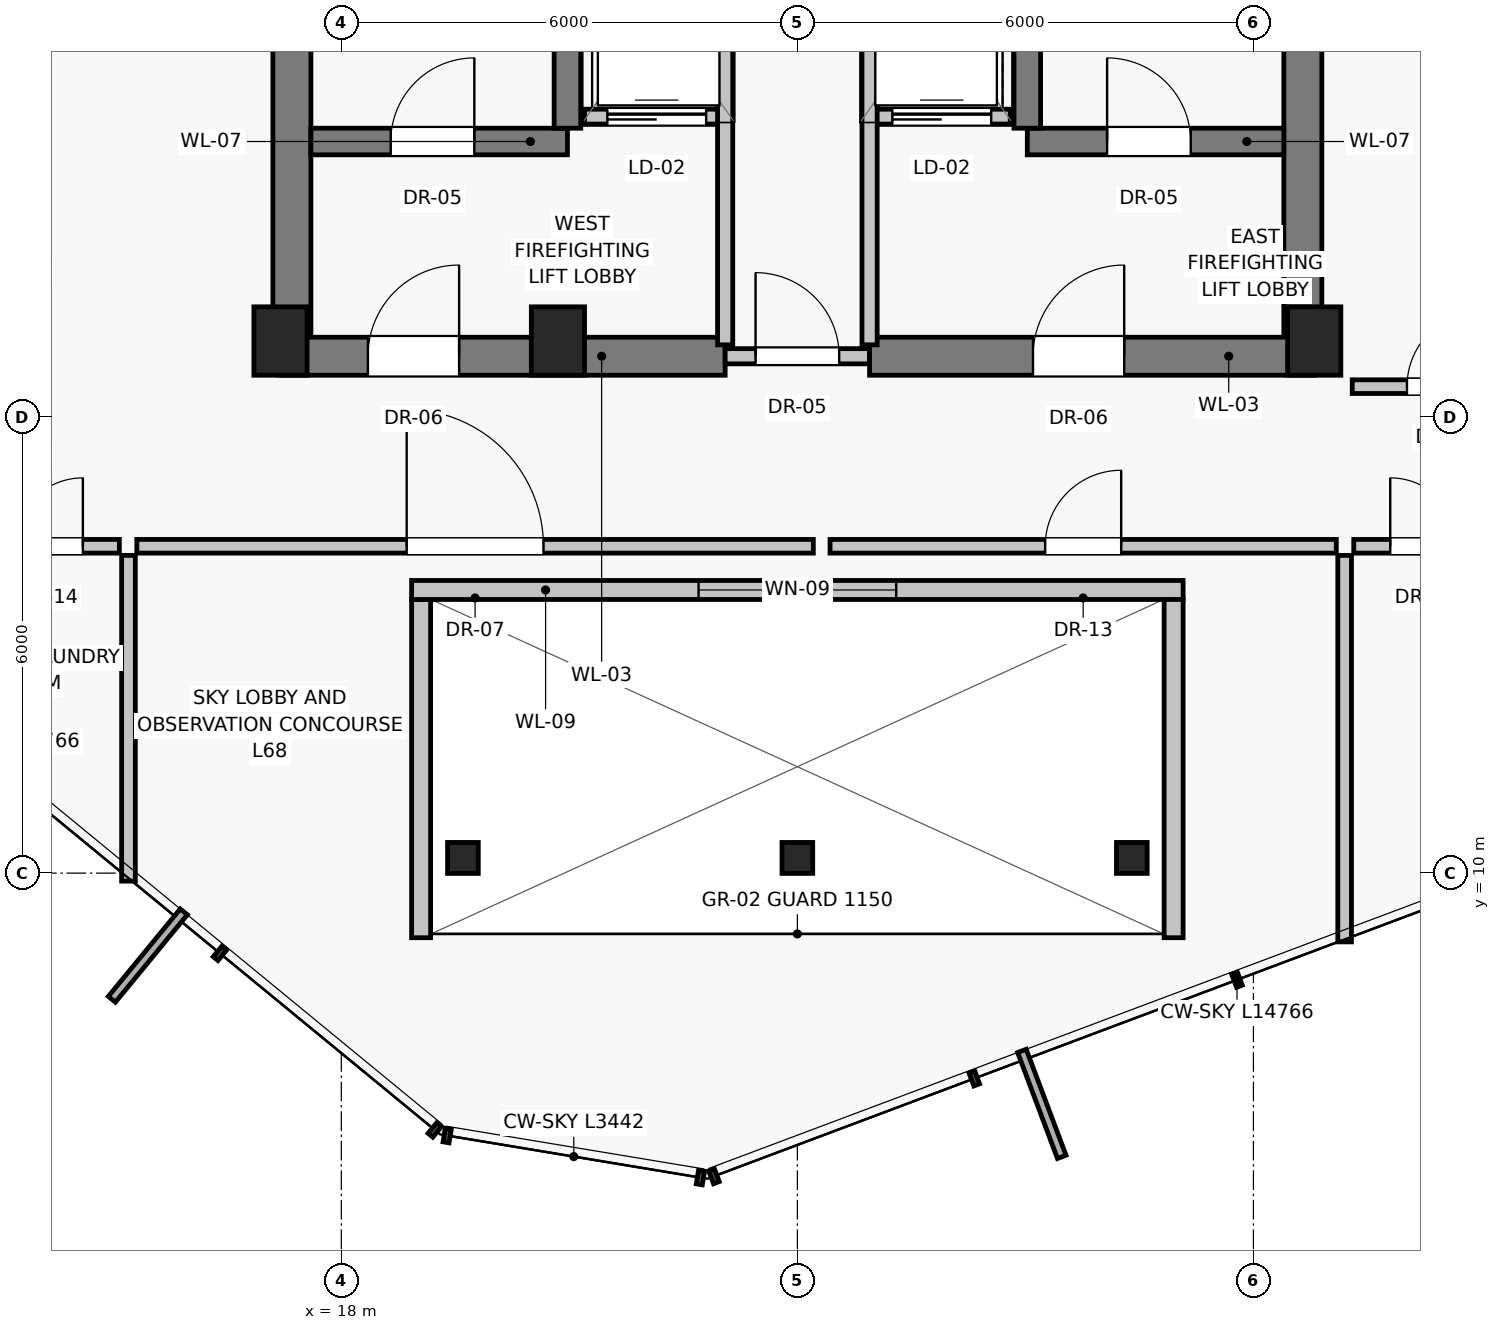
"""IFC4 building model, lengths in metres.
Left out: names, types, materials, properties, quantities, classifications, styles, units other than length and angle.
Written with IfcOpenShell. Run it as: python <this file> out.ifc"""

import sys

from ifc_helpers import new_model, si_unit, direction, frame, frame_2d, origin, origin_2d, place, context, subcontext, project, spatial, rectangle, i_section, extrude, source, transform, mapped, element, fill, save


model = new_model("IFC4")
c1 = context("Model", 3, precision=1e-05, world=origin(), true_north=direction((0.0, 1.0)))
c2 = subcontext(c1, "Body", "Model", "MODEL_VIEW")
j1 = project(units=[si_unit("LENGTHUNIT", "METRE"), si_unit("PLANEANGLEUNIT", "RADIAN")], contexts=[c1])
p1 = place(None, origin())
s1 = spatial("IfcSite", under=j1, at=p1, CompositionType="ELEMENT")
p2 = place(p1, origin())
s2 = spatial("IfcBuilding", under=s1, at=p2, CompositionType="ELEMENT")
p3 = place(p2, frame((0.0, 0.0, 240.65)))
s3 = spatial("IfcBuildingStorey", under=s2, at=p3, CompositionType="ELEMENT", Elevation=240.65)
for number, where, z_axis, x_axis in (
    (1, (17.2, 17.0, 0.0), (0.0, 0.0, 1.0), (1.0, 0.0, 0.0)),
    (2, (20.85, 17.0, 0.0), (0.0, 0.0, 1.0), (1.0, 0.0, 0.0)),
    (3, (30.8, 17.0, 0.0), (0.0, 0.0, 1.0), (1.0, 0.0, 0.0)),
):
    element("IfcColumn", number, at=place(p3, frame(where, z_axis=z_axis, x_axis=x_axis)), inside=s3, PredefinedType="PILASTER", context=c2, shape_type="SweptSolid", body=[
        extrude(rectangle(XDim=0.7, YDim=0.9, at=origin_2d()), origin(), (0.0, 0.0, 1.0), 4.1),
    ])
for number, where, z_axis, x_axis in (
    (4, (19.6, 10.2, 0.0), (0.0, 0.0, 1.0), (1.0, 0.0, 0.0)),
    (5, (24.0, 10.2, 0.0), (0.0, 0.0, 1.0), (1.0, 0.0, 0.0)),
    (6, (28.4, 10.2, 0.0), (0.0, 0.0, 1.0), (1.0, 0.0, 0.0)),
):
    element("IfcColumn", number, at=place(p3, frame(where, z_axis=z_axis, x_axis=x_axis)), inside=s3, PredefinedType="COLUMN", context=c2, shape_type="SweptSolid", body=[
        extrude(i_section(OverallWidth=0.404, OverallDepth=0.407, WebThickness=0.025, FlangeThickness=0.04, at=origin_2d()), origin(), (0.0, 0.0, 1.0), 4.1),
    ])
p4 = place(p3, frame((19.05, 9.15, 0.0), z_axis=(0.0, 0.0, 1.0), x_axis=(0.0, 1.0, 0.0)))
e7 = element("IfcWall", 7, at=p4, inside=s3, PredefinedType="SOLIDWALL", context=c2, shape_type="SweptSolid", body=[
    extrude(rectangle(XDim=4.45, YDim=0.25, at=frame_2d((2.225, 0.0))), origin(), (0.0, 0.0, 1.0), 3.393),
])
p5 = place(p3, frame((18.925, 13.725, 0.0), z_axis=(0.0, 0.0, 1.0), x_axis=(1.0, 0.0, 0.0)))
e8 = element("IfcWall", 8, at=p5, inside=s3, PredefinedType="SOLIDWALL", context=c2, shape_type="SweptSolid", body=[
    extrude(rectangle(XDim=10.15, YDim=0.25, at=frame_2d((5.075, 0.0))), origin(), (0.0, 0.0, 1.0), 3.512),
])
p6 = place(p5, frame((3.775, 0.0, 0.7)))
e9 = element("IfcOpeningElement", 9, at=p6, cuts=e8, PredefinedType="OPENING", context=c2, shape_type="SweptSolid", body=[
    extrude(rectangle(XDim=2.6, YDim=2.1, at=frame_2d((1.3, 1.05))), frame((0.0, 0.135, 0.0), z_axis=(0.0, -1.0, 0.0), x_axis=(1.0, 0.0, 0.0)), (0.0, 0.0, 1.0), 0.27),
])
p7 = place(p3, frame((28.95, 13.6, 0.0), z_axis=(0.0, 0.0, 1.0), x_axis=(0.0, -1.0, 0.0)))
e10 = element("IfcWall", 10, at=p7, inside=s3, PredefinedType="SOLIDWALL", context=c2, shape_type="SweptSolid", body=[
    extrude(rectangle(XDim=4.45, YDim=0.25, at=frame_2d((2.225, 0.0))), origin(), (0.0, 0.0, 1.0), 3.865),
])
for number, where, z_axis, x_axis in (
    (11, (17.35, 16.8, 0.0), (0.0, 0.0, 1.0), (0.0, 1.0, 0.0)),
    (12, (30.65, 16.8, 0.0), (0.0, 0.0, 1.0), (0.0, 1.0, 0.0)),
):
    element("IfcWall", number, at=place(p3, frame(where, z_axis=z_axis, x_axis=x_axis)), inside=s3, PredefinedType="SHEAR", context=c2, shape_type="SweptSolid", body=[
        extrude(rectangle(XDim=14.2, YDim=0.5, at=frame_2d((7.1, 0.0))), origin(), (0.0, 0.0, 1.0), 3.865),
    ])
p8 = place(p3, frame((17.2, 16.8, 0.0), z_axis=(0.0, 0.0, 1.0), x_axis=(1.0, 0.0, 0.0)))
e13 = element("IfcWall", 13, at=p8, inside=s3, PredefinedType="SHEAR", context=c2, shape_type="SweptSolid", body=[
    extrude(rectangle(XDim=5.85, YDim=0.5, at=frame_2d((2.925, 0.0))), origin(), (0.0, 0.0, 1.0), 3.865),
])
p9 = place(p8, frame((1.15, 0.0, 0.0)))
e14 = element("IfcOpeningElement", 14, at=p9, cuts=e13, PredefinedType="OPENING", context=c2, shape_type="SweptSolid", body=[
    extrude(rectangle(XDim=1.2, YDim=2.03, at=frame_2d((0.6, 1.015))), frame((0.0, 0.26, 0.0), z_axis=(0.0, -1.0, 0.0), x_axis=(1.0, 0.0, 0.0)), (0.0, 0.0, 1.0), 0.52),
])
p10 = place(p3, frame((23.05, 16.8, 0.0), z_axis=(0.0, 0.0, 1.0), x_axis=(1.0, 0.0, 0.0)))
e15 = element("IfcWall", 15, at=p10, inside=s3, PredefinedType="SOLIDWALL", context=c2, shape_type="SweptSolid", body=[
    extrude(rectangle(XDim=1.9, YDim=0.2, at=frame_2d((0.95, 0.0))), origin(), (0.0, 0.0, 1.0), 3.015),
])
p11 = place(p10, frame((0.4, 0.0, 0.0)))
e16 = element("IfcOpeningElement", 16, at=p11, cuts=e15, PredefinedType="OPENING", context=c2, shape_type="SweptSolid", body=[
    extrude(rectangle(XDim=1.1, YDim=2.03, at=frame_2d((0.55, 1.015))), frame((0.0, 0.11, 0.0), z_axis=(0.0, -1.0, 0.0), x_axis=(1.0, 0.0, 0.0)), (0.0, 0.0, 1.0), 0.22),
])
p12 = place(p3, frame((24.95, 16.8, 0.0), z_axis=(0.0, 0.0, 1.0), x_axis=(1.0, 0.0, 0.0)))
e17 = element("IfcWall", 17, at=p12, inside=s3, PredefinedType="SHEAR", context=c2, shape_type="SweptSolid", body=[
    extrude(rectangle(XDim=5.85, YDim=0.5, at=frame_2d((2.925, 0.0))), origin(), (0.0, 0.0, 1.0), 3.865),
])
p13 = place(p12, frame((2.15, 0.0, 0.0)))
e18 = element("IfcOpeningElement", 18, at=p13, cuts=e17, PredefinedType="OPENING", context=c2, shape_type="SweptSolid", body=[
    extrude(rectangle(XDim=1.2, YDim=2.03, at=frame_2d((0.6, 1.015))), frame((0.0, 0.26, 0.0), z_axis=(0.0, -1.0, 0.0), x_axis=(1.0, 0.0, 0.0)), (0.0, 0.0, 1.0), 0.52),
])
p14 = place(p3, frame((17.6, 19.625, 0.0), z_axis=(0.0, 0.0, 1.0), x_axis=(1.0, 0.0, 0.0)))
e19 = element("IfcWall", 19, at=p14, inside=s3, PredefinedType="SHEAR", context=c2, shape_type="SweptSolid", body=[
    extrude(rectangle(XDim=3.375, YDim=0.35, at=frame_2d((1.688, 0.0))), origin(), (0.0, 0.0, 1.0), 3.865),
])
p15 = place(p14, frame((1.05, 0.0, 0.0)))
e20 = element("IfcOpeningElement", 20, at=p15, cuts=e19, PredefinedType="OPENING", context=c2, shape_type="SweptSolid", body=[
    extrude(rectangle(XDim=1.1, YDim=2.03, at=frame_2d((0.55, 1.015))), frame((0.0, 0.185, 0.0), z_axis=(0.0, -1.0, 0.0), x_axis=(1.0, 0.0, 0.0)), (0.0, 0.0, 1.0), 0.37),
])
p16 = place(p3, frame((21.2, 19.95, 0.0), z_axis=(0.0, 0.0, 1.0), x_axis=(1.0, 0.0, 0.0)))
e21 = element("IfcWall", 21, at=p16, inside=s3, PredefinedType="SOLIDWALL", context=c2, shape_type="SweptSolid", body=[
    extrude(rectangle(XDim=1.85, YDim=0.2, at=frame_2d((0.925, 0.0))), origin(), (0.0, 0.0, 1.0), 3.865),
])
p17 = place(p16, frame((0.3, 0.0, 0.0)))
e22 = element("IfcOpeningElement", 22, at=p17, cuts=e21, PredefinedType="OPENING", context=c2, shape_type="SweptSolid", body=[
    extrude(rectangle(XDim=1.3, YDim=2.25, at=frame_2d((0.65, 1.125))), frame((0.0, 0.11, 0.0), z_axis=(0.0, -1.0, 0.0), x_axis=(1.0, 0.0, 0.0)), (0.0, 0.0, 1.0), 0.22),
])
p18 = place(p3, frame((24.95, 19.95, 0.0), z_axis=(0.0, 0.0, 1.0), x_axis=(1.0, 0.0, 0.0)))
e23 = element("IfcWall", 23, at=p18, inside=s3, PredefinedType="SOLIDWALL", context=c2, shape_type="SweptSolid", body=[
    extrude(rectangle(XDim=1.85, YDim=0.2, at=frame_2d((0.925, 0.0))), origin(), (0.0, 0.0, 1.0), 3.865),
])
p19 = place(p18, frame((0.3, 0.0, 0.0)))
e24 = element("IfcOpeningElement", 24, at=p19, cuts=e23, PredefinedType="OPENING", context=c2, shape_type="SweptSolid", body=[
    extrude(rectangle(XDim=1.3, YDim=2.25, at=frame_2d((0.65, 1.125))), frame((0.0, 0.11, 0.0), z_axis=(0.0, -1.0, 0.0), x_axis=(1.0, 0.0, 0.0)), (0.0, 0.0, 1.0), 0.22),
])
p20 = place(p3, frame((27.025, 19.625, 0.0), z_axis=(0.0, 0.0, 1.0), x_axis=(1.0, 0.0, 0.0)))
e25 = element("IfcWall", 25, at=p20, inside=s3, PredefinedType="SHEAR", context=c2, shape_type="SweptSolid", body=[
    extrude(rectangle(XDim=3.375, YDim=0.35, at=frame_2d((1.688, 0.0))), origin(), (0.0, 0.0, 1.0), 3.865),
])
p21 = place(p20, frame((1.05, 0.0, 0.0)))
e26 = element("IfcOpeningElement", 26, at=p21, cuts=e25, PredefinedType="OPENING", context=c2, shape_type="SweptSolid", body=[
    extrude(rectangle(XDim=1.1, YDim=2.03, at=frame_2d((0.55, 1.015))), frame((0.0, 0.185, 0.0), z_axis=(0.0, -1.0, 0.0), x_axis=(1.0, 0.0, 0.0)), (0.0, 0.0, 1.0), 0.37),
])
for number, where, z_axis, x_axis in (
    (27, (20.975, 19.8, 0.0), (0.0, 0.0, 1.0), (0.0, 1.0, 0.0)),
    (28, (27.025, 19.8, 0.0), (0.0, 0.0, 1.0), (0.0, 1.0, 0.0)),
):
    element("IfcWall", number, at=place(p3, frame(where, z_axis=z_axis, x_axis=x_axis)), inside=s3, PredefinedType="SHEAR", context=c2, shape_type="SweptSolid", body=[
        extrude(rectangle(XDim=8.775, YDim=0.35, at=frame_2d((4.387, 0.0))), origin(), (0.0, 0.0, 1.0), 3.865),
    ])
for number, where, z_axis, x_axis in (
    (29, (23.05, 16.95, 0.0), (0.0, 0.0, 1.0), (0.0, 1.0, 0.0)),
    (30, (24.95, 16.95, 0.0), (0.0, 0.0, 1.0), (0.0, 1.0, 0.0)),
):
    element("IfcWall", number, at=place(p3, frame(where, z_axis=z_axis, x_axis=x_axis)), inside=s3, PredefinedType="SOLIDWALL", context=c2, shape_type="SweptSolid", body=[
        extrude(rectangle(XDim=5.6, YDim=0.2, at=frame_2d((2.8, 0.0))), origin(), (0.0, 0.0, 1.0), 3.865),
    ])
p22 = place(p3, frame((15.2, 14.18, 0.0), z_axis=(0.0, 0.0, 1.0), x_axis=(0.0, -1.0, 0.0)))
e31 = element("IfcWall", 31, at=p22, inside=s3, PredefinedType="PARTITIONING", context=c2, shape_type="SweptSolid", body=[
    extrude(rectangle(XDim=4.285, YDim=0.18, at=frame_2d((2.143, 0.0))), origin(), (0.0, 0.0, 1.0), 3.865),
])
p23 = place(p3, frame((31.2, 14.18, 0.0), z_axis=(0.0, 0.0, 1.0), x_axis=(0.0, -1.0, 0.0)))
e32 = element("IfcWall", 32, at=p23, inside=s3, PredefinedType="PARTITIONING", context=c2, shape_type="SweptSolid", body=[
    extrude(rectangle(XDim=5.085, YDim=0.18, at=frame_2d((2.542, 0.0))), origin(), (0.0, 0.0, 1.0), 3.865),
])
p24 = place(p3, frame((15.31, 14.3, 0.0), z_axis=(0.0, 0.0, 1.0), x_axis=(1.0, 0.0, 0.0)))
e33 = element("IfcWall", 33, at=p24, inside=s3, PredefinedType="PARTITIONING", context=c2, shape_type="SweptSolid", body=[
    extrude(rectangle(XDim=8.9, YDim=0.18, at=frame_2d((4.45, 0.0))), origin(), (0.0, 0.0, 1.0), 3.865),
])
p25 = place(p24, frame((3.55, 0.0, 0.0)))
e34 = element("IfcOpeningElement", 34, at=p25, cuts=e33, PredefinedType="OPENING", context=c2, shape_type="SweptSolid", body=[
    extrude(rectangle(XDim=1.8, YDim=2.25, at=frame_2d((0.9, 1.125))), frame((0.0, 0.1, 0.0), z_axis=(0.0, -1.0, 0.0), x_axis=(1.0, 0.0, 0.0)), (0.0, 0.0, 1.0), 0.2),
])
p26 = place(p3, frame((24.43, 14.3, 0.0), z_axis=(0.0, 0.0, 1.0), x_axis=(1.0, 0.0, 0.0)))
e35 = element("IfcWall", 35, at=p26, inside=s3, PredefinedType="PARTITIONING", context=c2, shape_type="SweptSolid", body=[
    extrude(rectangle(XDim=6.66, YDim=0.18, at=frame_2d((3.33, 0.0))), origin(), (0.0, 0.0, 1.0), 3.865),
])
p27 = place(p26, frame((2.83, 0.0, 0.0)))
e36 = element("IfcOpeningElement", 36, at=p27, cuts=e35, PredefinedType="OPENING", context=c2, shape_type="SweptSolid", body=[
    extrude(rectangle(XDim=1.0, YDim=2.01, at=frame_2d((0.5, 1.005))), frame((0.0, 0.1, 0.0), z_axis=(0.0, -1.0, 0.0), x_axis=(1.0, 0.0, 0.0)), (0.0, 0.0, 1.0), 0.2),
])
p28 = place(p3, frame((31.3, 16.4, 0.0), z_axis=(0.0, 0.0, 1.0), x_axis=(1.0, 0.0, 0.0)))
e37 = element("IfcWall", 37, at=p28, inside=s3, PredefinedType="PARTITIONING", context=c2, shape_type="SweptSolid", body=[
    extrude(rectangle(XDim=1.92, YDim=0.18, at=frame_2d((0.96, 0.0))), origin(), (0.0, 0.0, 1.0), 3.865),
])
p29 = place(p28, frame((0.72, 0.0, 0.0)))
e38 = element("IfcOpeningElement", 38, at=p29, cuts=e37, PredefinedType="OPENING", context=c2, shape_type="SweptSolid", body=[
    extrude(rectangle(XDim=1.0, YDim=2.01, at=frame_2d((0.5, 1.005))), frame((0.0, 0.1, 0.0), z_axis=(0.0, -1.0, 0.0), x_axis=(1.0, 0.0, 0.0)), (0.0, 0.0, 1.0), 0.2),
])
p30 = place(p3, frame((13.22, 14.3, 0.0), z_axis=(0.0, 0.0, 1.0), x_axis=(1.0, 0.0, 0.0)))
e39 = element("IfcWall", 39, at=p30, inside=s3, PredefinedType="PARTITIONING", context=c2, shape_type="SweptSolid", body=[
    extrude(rectangle(XDim=1.86, YDim=0.18, at=frame_2d((0.93, 0.0))), origin(), (0.0, 0.0, 1.0), 3.865),
])
p31 = place(p30, frame((0.48, 0.0, 0.0)))
e40 = element("IfcOpeningElement", 40, at=p31, cuts=e39, PredefinedType="OPENING", context=c2, shape_type="SweptSolid", body=[
    extrude(rectangle(XDim=0.9, YDim=2.01, at=frame_2d((0.45, 1.005))), frame((0.0, 0.1, 0.0), z_axis=(0.0, -1.0, 0.0), x_axis=(1.0, 0.0, 0.0)), (0.0, 0.0, 1.0), 0.2),
])
p32 = place(p3, frame((31.32, 14.3, 0.0), z_axis=(0.0, 0.0, 1.0), x_axis=(1.0, 0.0, 0.0)))
e41 = element("IfcWall", 41, at=p32, inside=s3, PredefinedType="PARTITIONING", context=c2, shape_type="SweptSolid", body=[
    extrude(rectangle(XDim=1.86, YDim=0.18, at=frame_2d((0.93, 0.0))), origin(), (0.0, 0.0, 1.0), 3.865),
])
p33 = place(p32, frame((0.48, 0.0, 0.0)))
e42 = element("IfcOpeningElement", 42, at=p33, cuts=e41, PredefinedType="OPENING", context=c2, shape_type="SweptSolid", body=[
    extrude(rectangle(XDim=0.9, YDim=2.01, at=frame_2d((0.45, 1.005))), frame((0.0, 0.1, 0.0), z_axis=(0.0, -1.0, 0.0), x_axis=(1.0, 0.0, 0.0)), (0.0, 0.0, 1.0), 0.2),
])
m1 = source(origin(), c2, "Body", "SweptSolid", [
    extrude(rectangle(XDim=2.6, YDim=2.1, at=frame_2d((1.3, 1.05))), frame((0.0, 0.03, 0.0), z_axis=(0.0, -1.0, 0.0), x_axis=(1.0, 0.0, 0.0)), (0.0, 0.0, 1.0), 0.06),
])
p34 = place(p6, origin())
e43 = element("IfcWindow", 43, at=p34, inside=s3, PartitioningType="SINGLE_PANEL", PredefinedType="WINDOW", context=c2, shape_type="MappedRepresentation", body=[
    mapped(m1, transform((0.0, 0.0, 0.0), scale=1.0)),
])
fill(e9, e43)
m2 = source(origin(), c2, "Body", "SweptSolid", [
    extrude(rectangle(XDim=1.2, YDim=2.03, at=frame_2d((0.6, 1.015))), frame((0.0, 0.025, 0.0), z_axis=(0.0, -1.0, 0.0), x_axis=(1.0, 0.0, 0.0)), (0.0, 0.0, 1.0), 0.05),
])
p35 = place(p9, origin())
e44 = element("IfcDoor", 44, at=p35, inside=s3, OperationType="SINGLE_SWING_RIGHT", PredefinedType="DOOR", context=c2, shape_type="MappedRepresentation", body=[
    mapped(m2, transform((0.0, 0.0, 0.0), scale=1.0)),
])
fill(e14, e44)
m3 = source(origin(), c2, "Body", "SweptSolid", [
    extrude(rectangle(XDim=1.1, YDim=2.03, at=frame_2d((0.55, 1.015))), frame((0.0, 0.025, 0.0), z_axis=(0.0, -1.0, 0.0), x_axis=(1.0, 0.0, 0.0)), (0.0, 0.0, 1.0), 0.05),
])
p36 = place(p11, origin())
e45 = element("IfcDoor", 45, at=p36, inside=s3, OperationType="SINGLE_SWING_LEFT", PredefinedType="DOOR", context=c2, shape_type="MappedRepresentation", body=[
    mapped(m3, transform((0.0, 0.0, 0.0), scale=1.0)),
])
fill(e16, e45)
p37 = place(p13, origin())
e46 = element("IfcDoor", 46, at=p37, inside=s3, OperationType="SINGLE_SWING_RIGHT", PredefinedType="DOOR", context=c2, shape_type="MappedRepresentation", body=[
    mapped(m2, transform((0.0, 0.0, 0.0), scale=1.0)),
])
fill(e18, e46)
p38 = place(p15, origin())
e47 = element("IfcDoor", 47, at=p38, inside=s3, OperationType="SINGLE_SWING_RIGHT", PredefinedType="DOOR", context=c2, shape_type="MappedRepresentation", body=[
    mapped(m3, transform((0.0, 0.0, 0.0), scale=1.0)),
])
fill(e20, e47)
m4 = source(origin(), c2, "Body", "SweptSolid", [
    extrude(rectangle(XDim=1.3, YDim=2.25, at=frame_2d((0.65, 1.125))), frame((0.0, 0.025, 0.0), z_axis=(0.0, -1.0, 0.0), x_axis=(1.0, 0.0, 0.0)), (0.0, 0.0, 1.0), 0.05),
])
p39 = place(p17, origin())
e48 = element("IfcDoor", 48, at=p39, inside=s3, OperationType="SLIDING_TO_LEFT", PredefinedType="DOOR", context=c2, shape_type="MappedRepresentation", body=[
    mapped(m4, transform((0.0, 0.0, 0.0), scale=1.0)),
])
fill(e22, e48)
p40 = place(p19, origin())
e49 = element("IfcDoor", 49, at=p40, inside=s3, OperationType="SLIDING_TO_LEFT", PredefinedType="DOOR", context=c2, shape_type="MappedRepresentation", body=[
    mapped(m4, transform((0.0, 0.0, 0.0), scale=1.0)),
])
fill(e24, e49)
p41 = place(p21, origin())
e50 = element("IfcDoor", 50, at=p41, inside=s3, OperationType="SINGLE_SWING_LEFT", PredefinedType="DOOR", context=c2, shape_type="MappedRepresentation", body=[
    mapped(m3, transform((0.0, 0.0, 0.0), scale=1.0)),
])
fill(e26, e50)
m5 = source(origin(), c2, "Body", "SweptSolid", [
    extrude(rectangle(XDim=1.8, YDim=2.25, at=frame_2d((0.9, 1.125))), frame((0.0, 0.025, 0.0), z_axis=(0.0, -1.0, 0.0), x_axis=(1.0, 0.0, 0.0)), (0.0, 0.0, 1.0), 0.05),
])
p42 = place(p25, origin())
e51 = element("IfcDoor", 51, at=p42, inside=s3, OperationType="SINGLE_SWING_LEFT", PredefinedType="DOOR", context=c2, shape_type="MappedRepresentation", body=[
    mapped(m5, transform((0.0, 0.0, 0.0), scale=1.0)),
])
fill(e34, e51)
m6 = source(origin(), c2, "Body", "SweptSolid", [
    extrude(rectangle(XDim=1.0, YDim=2.01, at=frame_2d((0.5, 1.005))), frame((0.0, 0.025, 0.0), z_axis=(0.0, -1.0, 0.0), x_axis=(1.0, 0.0, 0.0)), (0.0, 0.0, 1.0), 0.05),
])
p43 = place(p27, origin())
e52 = element("IfcDoor", 52, at=p43, inside=s3, OperationType="SINGLE_SWING_RIGHT", PredefinedType="DOOR", context=c2, shape_type="MappedRepresentation", body=[
    mapped(m6, transform((0.0, 0.0, 0.0), scale=1.0)),
])
fill(e36, e52)
p44 = place(p29, origin())
e53 = element("IfcDoor", 53, at=p44, inside=s3, OperationType="SINGLE_SWING_RIGHT", PredefinedType="DOOR", context=c2, shape_type="MappedRepresentation", body=[
    mapped(m6, transform((0.0, 0.0, 0.0), scale=1.0)),
])
fill(e38, e53)
m7 = source(origin(), c2, "Body", "SweptSolid", [
    extrude(rectangle(XDim=0.9, YDim=2.01, at=frame_2d((0.45, 1.005))), frame((0.0, 0.025, 0.0), z_axis=(0.0, -1.0, 0.0), x_axis=(1.0, 0.0, 0.0)), (0.0, 0.0, 1.0), 0.05),
])
p45 = place(p31, origin())
e54 = element("IfcDoor", 54, at=p45, inside=s3, OperationType="SINGLE_SWING_RIGHT", PredefinedType="DOOR", context=c2, shape_type="MappedRepresentation", body=[
    mapped(m7, transform((0.0, 0.0, 0.0), scale=1.0)),
])
fill(e40, e54)
p46 = place(p33, origin())
e55 = element("IfcDoor", 55, at=p46, inside=s3, OperationType="SINGLE_SWING_LEFT", PredefinedType="DOOR", context=c2, shape_type="MappedRepresentation", body=[
    mapped(m7, transform((0.0, 0.0, 0.0), scale=1.0)),
])
fill(e42, e55)
save(model, sys.argv[1])
